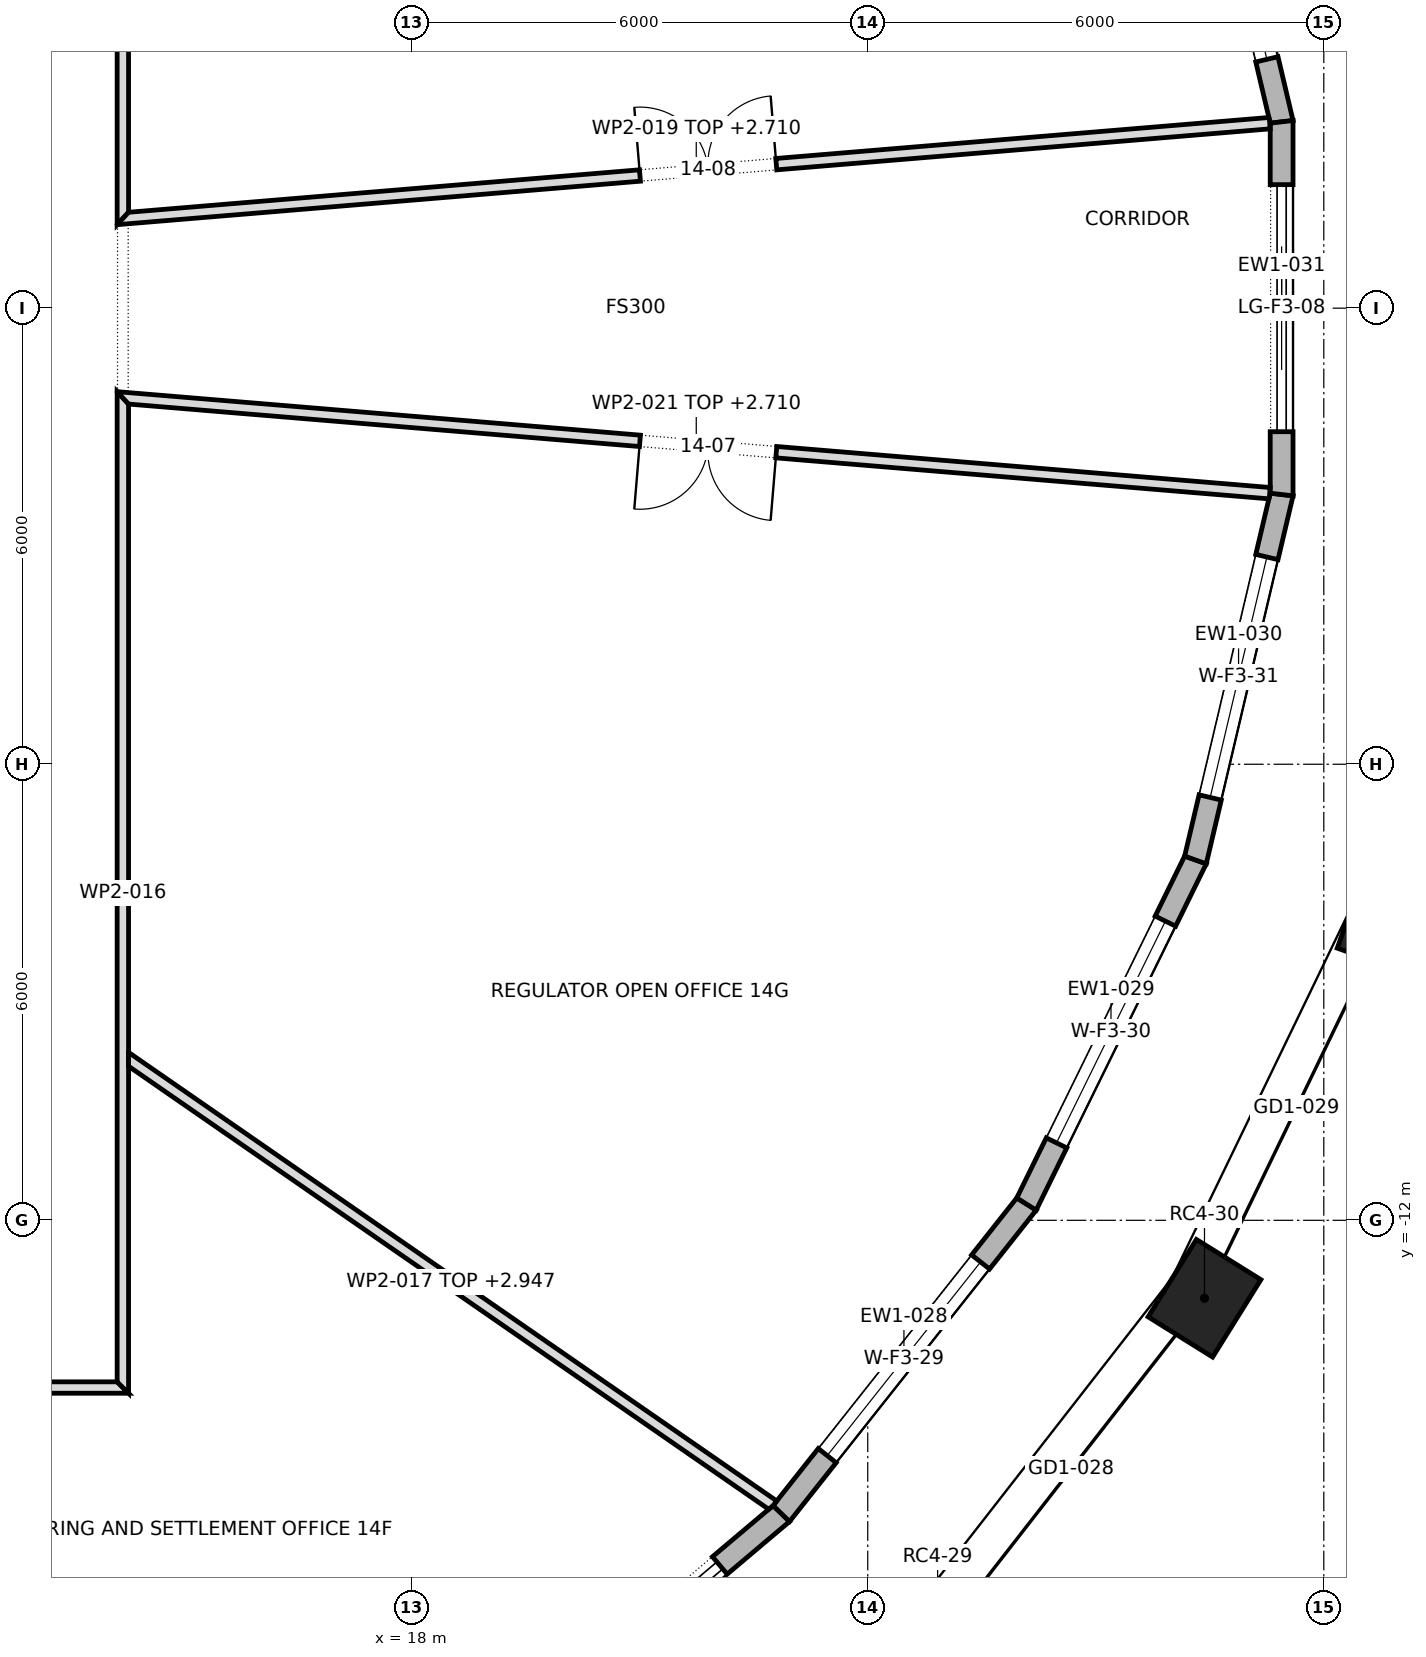
"""IFC4 building model, lengths in metres.
Left out: names, types, materials, properties, quantities, classifications, styles, units other than length and angle.
Written with IfcOpenShell. Run it as: python <this file> out.ifc"""

import sys

from ifc_helpers import new_model, si_unit, direction, frame, frame_2d, origin, origin_2d, place, context, subcontext, project, spatial, polyline, rectangle, outline, extrude, element, fill, save


model = new_model("IFC4")
c1 = context("Model", 3, precision=1e-05, world=origin(), true_north=direction((0.0, 1.0)))
c2 = subcontext(c1, "Body", "Model", "MODEL_VIEW")
j1 = project(units=[si_unit("LENGTHUNIT", "METRE"), si_unit("PLANEANGLEUNIT", "RADIAN")], contexts=[c1])
p1 = place(None, origin())
s1 = spatial("IfcSite", under=j1, at=p1, CompositionType="ELEMENT")
p2 = place(p1, origin())
s2 = spatial("IfcBuilding", under=s1, at=p2, CompositionType="ELEMENT")
p3 = place(p2, frame((0.0, 0.0, 202.9)))
s3 = spatial("IfcBuildingStorey", under=s2, at=p3, CompositionType="ELEMENT", Elevation=202.9)
for number, where, z_axis, x_axis in (
    (1, (28.43, -13.025, 0.0), (0.0, 0.0, 1.0), (0.529, 0.849, 0.0)),
    (2, (30.849, -8.021, 0.0), (0.0, 0.0, 1.0), (0.334, 0.943, 0.0)),
):
    element("IfcColumn", number, at=place(p3, frame(where, z_axis=z_axis, x_axis=x_axis)), inside=s3, PredefinedType="COLUMN", context=c2, shape_type="SweptSolid", body=[
        extrude(rectangle(XDim=1.2, YDim=1.0, at=origin_2d()), origin(), (0.0, 0.0, 1.0), 4.0),
    ])
p4 = place(p3, frame((29.445, 2.451, 0.0), z_axis=(0.0, 0.0, 1.0), x_axis=(-0.229535186351, 0.973300363828, 0.0)))
e3 = element("IfcWall", 3, at=p4, inside=s3, PredefinedType="STANDARD", context=c2, shape_type="SweptSolid", body=[
    extrude(outline(polyline([(-0.017, -0.15), (4.956, -0.15), (4.923, 0.15), (0.017, 0.15), (-0.017, -0.15)])), origin(), (0.0, 0.0, 1.0), 3.7),
])
p5 = place(p4, frame((0.845, 0.0, 0.6)))
e4 = element("IfcOpeningElement", 4, at=p5, cuts=e3, PredefinedType="OPENING", context=c2, shape_type="SweptSolid", body=[
    extrude(rectangle(XDim=3.25, YDim=2.65, at=frame_2d((1.625, 1.325))), frame((0.0, 0.162, 0.0), z_axis=(0.0, -1.0, 0.0), x_axis=(1.0, 0.0, 0.0)), (0.0, 0.0, 1.0), 0.324),
])
p6 = place(p3, frame((18.76, -19.319, 0.0), z_axis=(0.0, 0.0, 1.0), x_axis=(0.764386053229, 0.6447588399, 0.0)))
e5 = element("IfcWall", 5, at=p6, inside=s3, PredefinedType="STANDARD", context=c2, shape_type="SweptSolid", body=[
    extrude(outline(polyline([(-0.014, -0.15), (5.383, -0.15), (5.352, 0.15), (0.014, 0.15), (-0.014, -0.15)])), origin(), (0.0, 0.0, 1.0), 3.7),
])
p7 = place(p6, frame((1.059, 0.0, 0.0)))
e6 = element("IfcOpeningElement", 6, at=p7, cuts=e5, PredefinedType="OPENING", context=c2, shape_type="SweptSolid", body=[
    extrude(rectangle(XDim=3.25, YDim=3.25, at=frame_2d((1.625, 1.625))), frame((0.0, 0.162, 0.0), z_axis=(0.0, -1.0, 0.0), x_axis=(1.0, 0.0, 0.0)), (0.0, 0.0, 1.0), 0.324),
])
p8 = place(p3, frame((22.863, -15.858, 0.0), z_axis=(0.0, 0.0, 1.0), x_axis=(0.620870264345, 0.783913333763, 0.0)))
e7 = element("IfcWall", 7, at=p8, inside=s3, PredefinedType="STANDARD", context=c2, shape_type="SweptSolid", body=[
    extrude(outline(polyline([(-0.015, -0.15), (5.211, -0.15), (5.178, 0.15), (0.015, 0.15), (-0.015, -0.15)])), origin(), (0.0, 0.0, 1.0), 3.7),
])
p9 = place(p8, frame((0.972, 0.0, 0.6)))
e8 = element("IfcOpeningElement", 8, at=p9, cuts=e7, PredefinedType="OPENING", context=c2, shape_type="SweptSolid", body=[
    extrude(rectangle(XDim=3.25, YDim=2.65, at=frame_2d((1.625, 1.325))), frame((0.0, 0.162, 0.0), z_axis=(0.0, -1.0, 0.0), x_axis=(1.0, 0.0, 0.0)), (0.0, 0.0, 1.0), 0.324),
])
p10 = place(p3, frame((26.088, -11.786, 0.0), z_axis=(0.0, 0.0, 1.0), x_axis=(0.440773193145, 0.89761851151, 0.0)))
e9 = element("IfcWall", 9, at=p10, inside=s3, PredefinedType="STANDARD", context=c2, shape_type="SweptSolid", body=[
    extrude(outline(polyline([(-0.016, -0.15), (5.06, -0.15), (5.026, 0.15), (0.016, 0.15), (-0.016, -0.15)])), origin(), (0.0, 0.0, 1.0), 3.7),
])
p11 = place(p10, frame((0.896, 0.0, 0.6)))
e10 = element("IfcOpeningElement", 10, at=p11, cuts=e9, PredefinedType="OPENING", context=c2, shape_type="SweptSolid", body=[
    extrude(rectangle(XDim=3.25, YDim=2.65, at=frame_2d((1.625, 1.325))), frame((0.0, 0.162, 0.0), z_axis=(0.0, -1.0, 0.0), x_axis=(1.0, 0.0, 0.0)), (0.0, 0.0, 1.0), 0.324),
])
p12 = place(p3, frame((28.311, -7.259, 0.0), z_axis=(0.0, 0.0, 1.0), x_axis=(0.229535186351, 0.973300363828, 0.0)))
e11 = element("IfcWall", 11, at=p12, inside=s3, PredefinedType="STANDARD", context=c2, shape_type="SweptSolid", body=[
    extrude(outline(polyline([(-0.017, -0.15), (4.957, -0.15), (4.922, 0.15), (0.017, 0.15), (-0.017, -0.15)])), origin(), (0.0, 0.0, 1.0), 3.7),
])
p13 = place(p12, frame((0.845, 0.0, 0.6)))
e12 = element("IfcOpeningElement", 12, at=p13, cuts=e11, PredefinedType="OPENING", context=c2, shape_type="SweptSolid", body=[
    extrude(rectangle(XDim=3.25, YDim=2.65, at=frame_2d((1.625, 1.325))), frame((0.0, 0.162, 0.0), z_axis=(0.0, -1.0, 0.0), x_axis=(1.0, 0.0, 0.0)), (0.0, 0.0, 1.0), 0.324),
])
p14 = place(p3, frame((29.445, -2.451, 0.0), z_axis=(0.0, 0.0, 1.0), x_axis=(0.0, 1.0, 0.0)))
e13 = element("IfcWall", 13, at=p14, inside=s3, PredefinedType="STANDARD", context=c2, shape_type="SweptSolid", body=[
    extrude(outline(polyline([(-0.017, -0.15), (4.92, -0.15), (4.885, 0.15), (0.017, 0.15), (-0.017, -0.15)])), origin(), (0.0, 0.0, 1.0), 3.7),
])
p15 = place(p14, frame((0.826, 0.0, 0.0)))
e14 = element("IfcOpeningElement", 14, at=p15, cuts=e13, PredefinedType="OPENING", context=c2, shape_type="SweptSolid", body=[
    extrude(rectangle(XDim=3.25, YDim=3.25, at=frame_2d((1.625, 1.625))), frame((0.0, 0.162, 0.0), z_axis=(0.0, -1.0, 0.0), x_axis=(1.0, 0.0, 0.0)), (0.0, 0.0, 1.0), 0.324),
])
p16 = place(p3, frame((-14.275, -14.2, 0.0), z_axis=(0.0, 0.0, 1.0), x_axis=(1.0, 0.0, 0.0)))
e15 = element("IfcWall", 15, at=p16, inside=s3, PredefinedType="PARTITIONING", context=c2, shape_type="SweptSolid", body=[
    extrude(outline(polyline([(28.55, -0.075), (28.55, -0.075), (28.4, 0.075), (26.517, 0.075), (24.633, 0.075), (22.75, 0.075), (20.866, 0.075), (18.983, 0.075), (17.1, 0.075), (15.217, 0.075), (13.333, 0.075), (11.45, 0.075), (9.567, 0.075), (7.683, 0.075), (5.8, 0.075), (3.917, 0.075), (2.033, 0.075), (0.15, 0.075), (0.0, -0.075), (1.903, -0.075), (3.807, -0.075), (5.71, -0.075), (7.613, -0.075), (9.517, -0.075), (11.42, -0.075), (13.323, -0.075), (15.227, -0.075), (17.13, -0.075), (19.033, -0.075), (20.937, -0.075), (22.84, -0.075), (24.743, -0.075), (26.646, -0.075), (28.55, -0.075)])), origin(), (0.0, 0.0, 1.0), 3.7),
])
p17 = place(p16, frame((3.72, 0.0, 0.0)))
e16 = element("IfcOpeningElement", 16, at=p17, cuts=e15, PredefinedType="OPENING", context=c2, shape_type="SweptSolid", body=[
    extrude(rectangle(XDim=1.8, YDim=2.1, at=frame_2d((0.9, 1.05))), frame((0.0, 0.087, 0.0), z_axis=(0.0, -1.0, 0.0), x_axis=(1.0, 0.0, 0.0)), (0.0, 0.0, 1.0), 0.174),
])
p18 = place(p16, frame((13.775, 0.0, 0.0)))
e17 = element("IfcOpeningElement", 17, at=p18, cuts=e15, PredefinedType="OPENING", context=c2, shape_type="SweptSolid", body=[
    extrude(rectangle(XDim=1.0, YDim=2.1, at=frame_2d((0.5, 1.05))), frame((0.0, 0.087, 0.0), z_axis=(0.0, -1.0, 0.0), x_axis=(1.0, 0.0, 0.0)), (0.0, 0.0, 1.0), 0.174),
])
p19 = place(p16, frame((23.43, 0.0, 0.0)))
e18 = element("IfcOpeningElement", 18, at=p19, cuts=e15, PredefinedType="OPENING", context=c2, shape_type="SweptSolid", body=[
    extrude(rectangle(XDim=1.0, YDim=2.1, at=frame_2d((0.5, 1.05))), frame((0.0, 0.087, 0.0), z_axis=(0.0, -1.0, 0.0), x_axis=(1.0, 0.0, 0.0)), (0.0, 0.0, 1.0), 0.174),
])
p20 = place(p3, frame((14.2, -14.275, 0.0), z_axis=(0.0, 0.0, 1.0), x_axis=(0.0, 1.0, 0.0)))
e19 = element("IfcWall", 19, at=p20, inside=s3, PredefinedType="PARTITIONING", context=c2, shape_type="SweptSolid", body=[
    extrude(outline(polyline([(0.0, -0.075), (1.859, -0.075), (3.718, -0.075), (5.577, -0.075), (7.436, -0.075), (9.295, -0.075), (11.155, -0.075), (13.013, -0.075), (13.177, 0.075), (11.315, 0.075), (9.455, 0.075), (7.594, 0.075), (5.733, 0.075), (3.872, 0.075), (2.011, 0.075), (0.15, 0.075), (0.0, -0.075)])), origin(), (0.0, 0.0, 1.0), 3.7),
])
p21 = place(p3, frame((14.232, -9.853, 0.0), z_axis=(0.0, 0.0, 1.0), x_axis=(0.822298116352, -0.569056946047, 0.0)))
e20 = element("IfcWall", 20, at=p21, inside=s3, PredefinedType="PARTITIONING", context=c2, shape_type="SweptSolid", body=[
    extrude(outline(polyline([(0.104, -0.075), (1.811, -0.075), (3.518, -0.075), (5.225, -0.075), (6.932, -0.075), (8.639, -0.075), (10.346, -0.075), (10.366, -0.002), (10.37, 0.07), (10.37, 0.075), (8.642, 0.075), (6.914, 0.075), (5.185, 0.075), (3.457, 0.075), (1.729, 0.075), (0.0, 0.075), (0.0, 0.075), (0.104, -0.075)])), origin(), (0.0, 0.0, 1.0), 2.947),
])
p22 = place(p3, frame((14.2, 1.098, 0.0), z_axis=(0.0, 0.0, 1.0), x_axis=(0.0, 1.0, 0.0)))
e21 = element("IfcWall", 21, at=p22, inside=s3, PredefinedType="PARTITIONING", context=c2, shape_type="SweptSolid", body=[
    extrude(outline(polyline([(0.163, -0.075), (2.022, -0.075), (3.881, -0.075), (5.74, -0.075), (7.599, -0.075), (9.458, -0.075), (11.317, -0.075), (13.177, -0.075), (13.027, 0.075), (11.166, 0.075), (9.305, 0.075), (7.444, 0.075), (5.583, 0.075), (3.722, 0.075), (1.861, 0.075), (0.0, 0.075), (0.163, -0.075)])), origin(), (0.0, 0.0, 1.0), 3.7),
])
p23 = place(p3, frame((14.119, 1.173, 0.0), z_axis=(0.0, 0.0, 1.0), x_axis=(0.996562771728, 0.082841064731, 0.0)))
e22 = element("IfcWall", 22, at=p23, inside=s3, PredefinedType="PARTITIONING", context=c2, shape_type="SweptSolid", body=[
    extrude(outline(polyline([(15.222, -0.075), (15.222, 0.045), (15.217, 0.075), (13.335, 0.075), (11.454, 0.075), (9.572, 0.075), (7.69, 0.075), (5.808, 0.075), (3.926, 0.075), (2.044, 0.075), (0.163, 0.075), (0.081, 0.0), (0.0, -0.075), (0.0, -0.075), (1.903, -0.075), (3.805, -0.075), (5.708, -0.075), (7.611, -0.075), (9.514, -0.075), (11.416, -0.075), (13.319, -0.075), (15.222, -0.075)])), origin(), (0.0, 0.0, 1.0), 2.71),
])
p24 = place(p23, frame((6.908, 0.0, 0.0)))
e23 = element("IfcOpeningElement", 23, at=p24, cuts=e22, PredefinedType="OPENING", context=c2, shape_type="SweptSolid", body=[
    extrude(rectangle(XDim=1.8, YDim=2.1, at=frame_2d((0.9, 1.05))), frame((0.0, 0.087, 0.0), z_axis=(0.0, -1.0, 0.0), x_axis=(1.0, 0.0, 0.0)), (0.0, 0.0, 1.0), 0.174),
])
p25 = place(p3, frame((29.288, -2.434, 0.0), z_axis=(0.0, 0.0, 1.0), x_axis=(-0.996562771728, 0.082841064731, 0.0)))
e24 = element("IfcWall", 24, at=p25, inside=s3, PredefinedType="PARTITIONING", context=c2, shape_type="SweptSolid", body=[
    extrude(outline(polyline([(15.222, -0.075), (15.222, -0.075), (15.14, 0.0), (15.059, 0.075), (13.177, 0.075), (11.295, 0.075), (9.414, 0.075), (7.532, 0.075), (5.65, 0.075), (3.768, 0.075), (1.886, 0.075), (0.005, 0.075), (0.0, 0.044), (0.0, -0.075), (1.903, -0.075), (3.805, -0.075), (5.708, -0.075), (7.611, -0.075), (9.514, -0.075), (11.416, -0.075), (13.319, -0.075), (15.222, -0.075)])), origin(), (0.0, 0.0, 1.0), 2.71),
])
p26 = place(p25, frame((6.514, 0.0, 0.0)))
e25 = element("IfcOpeningElement", 25, at=p26, cuts=e24, PredefinedType="OPENING", context=c2, shape_type="SweptSolid", body=[
    extrude(rectangle(XDim=1.8, YDim=2.1, at=frame_2d((0.9, 1.05))), frame((0.0, 0.087, 0.0), z_axis=(0.0, -1.0, 0.0), x_axis=(1.0, 0.0, 0.0)), (0.0, 0.0, 1.0), 0.174),
])
p27 = place(p5, origin())
e26 = element("IfcWindow", 26, at=p27, inside=s3, PartitioningType="TRIPLE_PANEL_VERTICAL", PredefinedType="WINDOW", context=c2, shape_type="SweptSolid", body=[
    extrude(rectangle(XDim=3.25, YDim=2.65, at=frame_2d((1.625, 1.325))), frame((0.0, 0.03, 0.0), z_axis=(0.0, -1.0, 0.0), x_axis=(1.0, 0.0, 0.0)), (0.0, 0.0, 1.0), 0.06),
])
fill(e4, e26)
p28 = place(p7, origin())
e27 = element("IfcDoor", 27, at=p28, inside=s3, OperationType="DOUBLE_DOOR_SLIDING", PredefinedType="DOOR", context=c2, shape_type="SweptSolid", body=[
    extrude(rectangle(XDim=3.25, YDim=3.25, at=frame_2d((1.625, 1.625))), frame((0.0, 0.025, 0.0), z_axis=(0.0, -1.0, 0.0), x_axis=(1.0, 0.0, 0.0)), (0.0, 0.0, 1.0), 0.05),
])
fill(e6, e27)
p29 = place(p9, origin())
e28 = element("IfcWindow", 28, at=p29, inside=s3, PartitioningType="TRIPLE_PANEL_VERTICAL", PredefinedType="WINDOW", context=c2, shape_type="SweptSolid", body=[
    extrude(rectangle(XDim=3.25, YDim=2.65, at=frame_2d((1.625, 1.325))), frame((0.0, 0.03, 0.0), z_axis=(0.0, -1.0, 0.0), x_axis=(1.0, 0.0, 0.0)), (0.0, 0.0, 1.0), 0.06),
])
fill(e8, e28)
p30 = place(p11, origin())
e29 = element("IfcWindow", 29, at=p30, inside=s3, PartitioningType="TRIPLE_PANEL_VERTICAL", PredefinedType="WINDOW", context=c2, shape_type="SweptSolid", body=[
    extrude(rectangle(XDim=3.25, YDim=2.65, at=frame_2d((1.625, 1.325))), frame((0.0, 0.03, 0.0), z_axis=(0.0, -1.0, 0.0), x_axis=(1.0, 0.0, 0.0)), (0.0, 0.0, 1.0), 0.06),
])
fill(e10, e29)
p31 = place(p13, origin())
e30 = element("IfcWindow", 30, at=p31, inside=s3, PartitioningType="TRIPLE_PANEL_VERTICAL", PredefinedType="WINDOW", context=c2, shape_type="SweptSolid", body=[
    extrude(rectangle(XDim=3.25, YDim=2.65, at=frame_2d((1.625, 1.325))), frame((0.0, 0.03, 0.0), z_axis=(0.0, -1.0, 0.0), x_axis=(1.0, 0.0, 0.0)), (0.0, 0.0, 1.0), 0.06),
])
fill(e12, e30)
p32 = place(p15, origin())
e31 = element("IfcDoor", 31, at=p32, inside=s3, OperationType="DOUBLE_DOOR_SLIDING", PredefinedType="DOOR", context=c2, shape_type="SweptSolid", body=[
    extrude(rectangle(XDim=3.25, YDim=3.25, at=frame_2d((1.625, 1.625))), frame((0.0, 0.025, 0.0), z_axis=(0.0, -1.0, 0.0), x_axis=(1.0, 0.0, 0.0)), (0.0, 0.0, 1.0), 0.05),
])
fill(e14, e31)
p33 = place(p26, origin())
e32 = element("IfcDoor", 32, at=p33, inside=s3, OperationType="DOUBLE_DOOR_SINGLE_SWING", PredefinedType="DOOR", context=c2, shape_type="SweptSolid", body=[
    extrude(rectangle(XDim=1.8, YDim=2.1, at=frame_2d((0.9, 1.05))), frame((0.0, 0.025, 0.0), z_axis=(0.0, -1.0, 0.0), x_axis=(1.0, 0.0, 0.0)), (0.0, 0.0, 1.0), 0.05),
])
fill(e25, e32)
p34 = place(p24, origin())
e33 = element("IfcDoor", 33, at=p34, inside=s3, OperationType="DOUBLE_DOOR_SINGLE_SWING", PredefinedType="DOOR", context=c2, shape_type="SweptSolid", body=[
    extrude(rectangle(XDim=1.8, YDim=2.1, at=frame_2d((0.9, 1.05))), frame((0.0, 0.025, 0.0), z_axis=(0.0, -1.0, 0.0), x_axis=(1.0, 0.0, 0.0)), (0.0, 0.0, 1.0), 0.05),
])
fill(e23, e33)
save(model, sys.argv[1])
